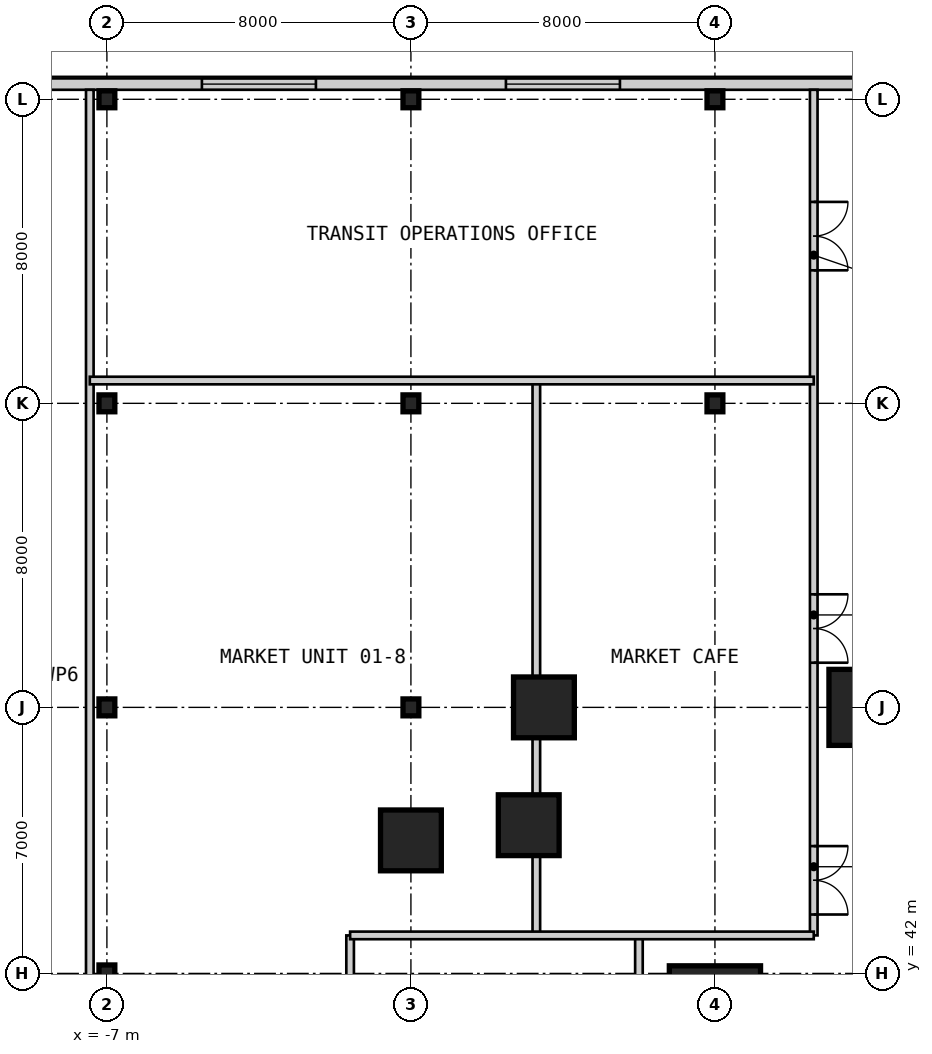
"""IFC4 building model, lengths in metres.
Left out: names, types, materials, properties, quantities, classifications, styles, units other than length and angle.
Written with IfcOpenShell. Run it as: python <this file> out.ifc"""

import sys

from ifc_helpers import new_model, si_unit, direction, frame, frame_2d, origin, origin_2d, place, context, subcontext, project, spatial, rectangle, i_section, extrude, element, fill, save


model = new_model("IFC4")
c1 = context("Model", 3, precision=1e-05, world=origin(), true_north=direction((0.0, 1.0)))
c2 = subcontext(c1, "Body", "Model", "MODEL_VIEW")
j1 = project(units=[si_unit("LENGTHUNIT", "METRE"), si_unit("PLANEANGLEUNIT", "RADIAN")], contexts=[c1])
p1 = place(None, origin())
s1 = spatial("IfcSite", under=j1, at=p1, CompositionType="ELEMENT")
p2 = place(p1, origin())
s2 = spatial("IfcBuilding", under=s1, at=p2, CompositionType="ELEMENT")
p3 = place(p2, frame((0.0, 0.0, 7.0)))
s3 = spatial("IfcBuildingStorey", under=s2, at=p3, CompositionType="ELEMENT", Elevation=7.0)
p4 = place(p3, frame((9.0, 41.0, 0.0), z_axis=(0.0, 0.0, 1.0), x_axis=(1.0, 0.0, 0.0)))
e1 = element("IfcColumn", 1, at=p4, inside=s3, PredefinedType="COLUMN", context=c2, shape_type="SweptSolid", body=[
    extrude(rectangle(XDim=2.4, YDim=2.4, at=origin_2d()), origin(), (0.0, 0.0, 1.0), 4.8),
])
p5 = place(p3, frame((13.0, 49.0, 0.0), z_axis=(0.0, 0.0, 1.0), x_axis=(1.0, 0.0, 0.0)))
e2 = element("IfcColumn", 2, at=p5, inside=s3, PredefinedType="COLUMN", context=c2, shape_type="SweptSolid", body=[
    extrude(rectangle(XDim=2.0, YDim=2.0, at=origin_2d()), origin(), (0.0, 0.0, 1.0), 4.8),
])
for number, where, z_axis, x_axis in (
    (3, (4.5, 49.0, 0.0), (0.0, 0.0, 1.0), (1.0, 0.0, 0.0)),
    (4, (4.1, 45.9, 0.0), (0.0, 0.0, 1.0), (1.0, 0.0, 0.0)),
    (5, (1.0, 45.5, 0.0), (0.0, 0.0, 1.0), (1.0, 0.0, 0.0)),
):
    element("IfcColumn", number, at=place(p3, frame(where, z_axis=z_axis, x_axis=x_axis)), inside=s3, PredefinedType="COLUMN", context=c2, shape_type="SweptSolid", body=[
        extrude(rectangle(XDim=1.6, YDim=1.6, at=origin_2d()), origin(), (0.0, 0.0, 1.0), 4.8),
    ])
for number, where, z_axis, x_axis in (
    (6, (-7.0, 42.0, 0.0), (0.0, 0.0, 1.0), (1.0, 0.0, 0.0)),
    (7, (-7.0, 49.0, 0.0), (0.0, 0.0, 1.0), (1.0, 0.0, 0.0)),
    (8, (-7.0, 57.0, 0.0), (0.0, 0.0, 1.0), (1.0, 0.0, 0.0)),
    (9, (-7.0, 65.0, 0.0), (0.0, 0.0, 1.0), (1.0, 0.0, 0.0)),
    (10, (1.0, 49.0, 0.0), (0.0, 0.0, 1.0), (1.0, 0.0, 0.0)),
    (11, (1.0, 57.0, 0.0), (0.0, 0.0, 1.0), (1.0, 0.0, 0.0)),
    (12, (1.0, 65.0, 0.0), (0.0, 0.0, 1.0), (1.0, 0.0, 0.0)),
    (13, (9.0, 57.0, 0.0), (0.0, 0.0, 1.0), (1.0, 0.0, 0.0)),
    (14, (9.0, 65.0, 0.0), (0.0, 0.0, 1.0), (1.0, 0.0, 0.0)),
):
    element("IfcColumn", number, at=place(p3, frame(where, z_axis=z_axis, x_axis=x_axis)), inside=s3, PredefinedType="COLUMN", context=c2, shape_type="SweptSolid", body=[
        extrude(i_section(OverallWidth=0.417, OverallDepth=0.445, WebThickness=0.039, FlangeThickness=0.063, at=origin_2d()), origin(), (0.0, 0.0, 1.0), 4.8),
    ])
p6 = place(p3, frame((65.55, 65.4, 0.0), z_axis=(0.0, 0.0, 1.0), x_axis=(-1.0, 0.0, 0.0)))
e15 = element("IfcWall", 15, at=p6, inside=s3, PredefinedType="SOLIDWALL", context=c2, shape_type="SweptSolid", body=[
    extrude(rectangle(XDim=81.1, YDim=0.3, at=frame_2d((40.55, 0.0))), origin(), (0.0, 0.0, 1.0), 4.5),
])
p7 = place(p6, frame((75.05, 0.0, 0.9)))
e16 = element("IfcOpeningElement", 16, at=p7, cuts=e15, PredefinedType="OPENING", context=c2, shape_type="SweptSolid", body=[
    extrude(rectangle(XDim=3.0, YDim=2.4, at=frame_2d((1.5, 1.2))), frame((0.0, 0.16, 0.0), z_axis=(0.0, -1.0, 0.0), x_axis=(1.0, 0.0, 0.0)), (0.0, 0.0, 1.0), 0.32),
])
p8 = place(p6, frame((67.05, 0.0, 0.9)))
e17 = element("IfcOpeningElement", 17, at=p8, cuts=e15, PredefinedType="OPENING", context=c2, shape_type="SweptSolid", body=[
    extrude(rectangle(XDim=3.0, YDim=2.4, at=frame_2d((1.5, 1.2))), frame((0.0, 0.16, 0.0), z_axis=(0.0, -1.0, 0.0), x_axis=(1.0, 0.0, 0.0)), (0.0, 0.0, 1.0), 0.32),
])
p9 = place(p6, frame((59.05, 0.0, 0.9)))
e18 = element("IfcOpeningElement", 18, at=p9, cuts=e15, PredefinedType="OPENING", context=c2, shape_type="SweptSolid", body=[
    extrude(rectangle(XDim=3.0, YDim=2.4, at=frame_2d((1.5, 1.2))), frame((0.0, 0.16, 0.0), z_axis=(0.0, -1.0, 0.0), x_axis=(1.0, 0.0, 0.0)), (0.0, 0.0, 1.0), 0.32),
])
p10 = place(p6, frame((45.05, 0.0, 0.9)))
e19 = element("IfcOpeningElement", 19, at=p10, cuts=e15, PredefinedType="OPENING", context=c2, shape_type="SweptSolid", body=[
    extrude(rectangle(XDim=3.0, YDim=2.4, at=frame_2d((1.5, 1.2))), frame((0.0, 0.16, 0.0), z_axis=(0.0, -1.0, 0.0), x_axis=(1.0, 0.0, 0.0)), (0.0, 0.0, 1.0), 0.32),
])
p11 = place(p6, frame((33.05, 0.0, 0.9)))
e20 = element("IfcOpeningElement", 20, at=p11, cuts=e15, PredefinedType="OPENING", context=c2, shape_type="SweptSolid", body=[
    extrude(rectangle(XDim=3.0, YDim=2.4, at=frame_2d((1.5, 1.2))), frame((0.0, 0.16, 0.0), z_axis=(0.0, -1.0, 0.0), x_axis=(1.0, 0.0, 0.0)), (0.0, 0.0, 1.0), 0.32),
])
p12 = place(p6, frame((24.55, 0.0, 0.9)))
e21 = element("IfcOpeningElement", 21, at=p12, cuts=e15, PredefinedType="OPENING", context=c2, shape_type="SweptSolid", body=[
    extrude(rectangle(XDim=3.0, YDim=2.4, at=frame_2d((1.5, 1.2))), frame((0.0, 0.16, 0.0), z_axis=(0.0, -1.0, 0.0), x_axis=(1.0, 0.0, 0.0)), (0.0, 0.0, 1.0), 0.32),
])
p13 = place(p6, frame((18.55, 0.0, 0.9)))
e22 = element("IfcOpeningElement", 22, at=p13, cuts=e15, PredefinedType="OPENING", context=c2, shape_type="SweptSolid", body=[
    extrude(rectangle(XDim=3.0, YDim=2.4, at=frame_2d((1.5, 1.2))), frame((0.0, 0.16, 0.0), z_axis=(0.0, -1.0, 0.0), x_axis=(1.0, 0.0, 0.0)), (0.0, 0.0, 1.0), 0.32),
])
p14 = place(p6, frame((11.05, 0.0, 0.9)))
e23 = element("IfcOpeningElement", 23, at=p14, cuts=e15, PredefinedType="OPENING", context=c2, shape_type="SweptSolid", body=[
    extrude(rectangle(XDim=3.0, YDim=2.4, at=frame_2d((1.5, 1.2))), frame((0.0, 0.16, 0.0), z_axis=(0.0, -1.0, 0.0), x_axis=(1.0, 0.0, 0.0)), (0.0, 0.0, 1.0), 0.32),
])
p15 = place(p6, frame((3.05, 0.0, 0.9)))
e24 = element("IfcOpeningElement", 24, at=p15, cuts=e15, PredefinedType="OPENING", context=c2, shape_type="SweptSolid", body=[
    extrude(rectangle(XDim=3.0, YDim=2.4, at=frame_2d((1.5, 1.2))), frame((0.0, 0.16, 0.0), z_axis=(0.0, -1.0, 0.0), x_axis=(1.0, 0.0, 0.0)), (0.0, 0.0, 1.0), 0.32),
])
p16 = place(p3, frame((-7.45, 34.4, 0.0), z_axis=(0.0, 0.0, 1.0), x_axis=(0.0, 1.0, 0.0)))
e25 = element("IfcWall", 25, at=p16, inside=s3, PredefinedType="PARTITIONING", context=c2, shape_type="SweptSolid", body=[
    extrude(rectangle(XDim=30.85, YDim=0.2, at=frame_2d((15.425, 0.0))), origin(), (0.0, 0.0, 1.0), 4.5),
])
p17 = place(p3, frame((-0.6, 34.4, 0.0), z_axis=(0.0, 0.0, 1.0), x_axis=(0.0, 1.0, 0.0)))
e26 = element("IfcWall", 26, at=p17, inside=s3, PredefinedType="PARTITIONING", context=c2, shape_type="SweptSolid", body=[
    extrude(rectangle(XDim=8.6, YDim=0.2, at=frame_2d((4.3, 0.0))), origin(), (0.0, 0.0, 1.0), 4.5),
])
p18 = place(p3, frame((4.3, 43.0, 0.0), z_axis=(0.0, 0.0, 1.0), x_axis=(0.0, 1.0, 0.0)))
e27 = element("IfcWall", 27, at=p18, inside=s3, PredefinedType="PARTITIONING", context=c2, shape_type="SweptSolid", body=[
    extrude(rectangle(XDim=2.1, YDim=0.2, at=frame_2d((1.05, 0.0))), origin(), (0.0, 0.0, 1.0), 4.5),
])
p19 = place(p3, frame((4.3, 46.7, 0.0), z_axis=(0.0, 0.0, 1.0), x_axis=(0.0, 1.0, 0.0)))
e28 = element("IfcWall", 28, at=p19, inside=s3, PredefinedType="PARTITIONING", context=c2, shape_type="SweptSolid", body=[
    extrude(rectangle(XDim=1.5, YDim=0.2, at=frame_2d((0.75, 0.0))), origin(), (0.0, 0.0, 1.0), 3.65),
])
p20 = place(p3, frame((4.3, 49.8, 0.0), z_axis=(0.0, 0.0, 1.0), x_axis=(0.0, 1.0, 0.0)))
e29 = element("IfcWall", 29, at=p20, inside=s3, PredefinedType="PARTITIONING", context=c2, shape_type="SweptSolid", body=[
    extrude(rectangle(XDim=7.8, YDim=0.2, at=frame_2d((3.9, 0.0))), origin(), (0.0, 0.0, 1.0), 4.5),
])
p21 = place(p3, frame((7.0, 22.0, 0.0), z_axis=(0.0, 0.0, 1.0), x_axis=(0.0, 1.0, 0.0)))
e30 = element("IfcWall", 30, at=p21, inside=s3, PredefinedType="PARTITIONING", context=c2, shape_type="SweptSolid", body=[
    extrude(rectangle(XDim=21.0, YDim=0.2, at=frame_2d((10.5, 0.0))), origin(), (0.0, 0.0, 1.0), 3.843),
])
p22 = place(p3, frame((11.6, 43.0, 0.0), z_axis=(0.0, 0.0, 1.0), x_axis=(0.0, 1.0, 0.0)))
e31 = element("IfcWall", 31, at=p22, inside=s3, PredefinedType="PARTITIONING", context=c2, shape_type="SweptSolid", body=[
    extrude(rectangle(XDim=22.25, YDim=0.2, at=frame_2d((11.125, 0.0))), origin(), (0.0, 0.0, 1.0), 4.5),
])
p23 = place(p22, frame((7.175, 0.0, 0.0)))
e32 = element("IfcOpeningElement", 32, at=p23, cuts=e31, PredefinedType="OPENING", context=c2, shape_type="SweptSolid", body=[
    extrude(rectangle(XDim=1.8, YDim=2.4, at=frame_2d((0.9, 1.2))), frame((0.0, 0.11, 0.0), z_axis=(0.0, -1.0, 0.0), x_axis=(1.0, 0.0, 0.0)), (0.0, 0.0, 1.0), 0.22),
])
p24 = place(p22, frame((0.55, 0.0, 0.0)))
e33 = element("IfcOpeningElement", 33, at=p24, cuts=e31, PredefinedType="OPENING", context=c2, shape_type="SweptSolid", body=[
    extrude(rectangle(XDim=1.8, YDim=2.4, at=frame_2d((0.9, 1.2))), frame((0.0, 0.11, 0.0), z_axis=(0.0, -1.0, 0.0), x_axis=(1.0, 0.0, 0.0)), (0.0, 0.0, 1.0), 0.22),
])
p25 = place(p22, frame((17.5, 0.0, 0.0)))
e34 = element("IfcOpeningElement", 34, at=p25, cuts=e31, PredefinedType="OPENING", context=c2, shape_type="SweptSolid", body=[
    extrude(rectangle(XDim=1.8, YDim=2.4, at=frame_2d((0.9, 1.2))), frame((0.0, 0.11, 0.0), z_axis=(0.0, -1.0, 0.0), x_axis=(1.0, 0.0, 0.0)), (0.0, 0.0, 1.0), 0.22),
])
p26 = place(p3, frame((-0.6, 43.0, 0.0), z_axis=(0.0, 0.0, 1.0), x_axis=(1.0, 0.0, 0.0)))
e35 = element("IfcWall", 35, at=p26, inside=s3, PredefinedType="PARTITIONING", context=c2, shape_type="SweptSolid", body=[
    extrude(rectangle(XDim=12.2, YDim=0.2, at=frame_2d((6.1, 0.0))), origin(), (0.0, 0.0, 1.0), 4.5),
])
p27 = place(p3, frame((-7.45, 57.6, 0.0), z_axis=(0.0, 0.0, 1.0), x_axis=(1.0, 0.0, 0.0)))
e36 = element("IfcWall", 36, at=p27, inside=s3, PredefinedType="PARTITIONING", context=c2, shape_type="SweptSolid", body=[
    extrude(rectangle(XDim=19.05, YDim=0.2, at=frame_2d((9.525, 0.0))), origin(), (0.0, 0.0, 1.0), 4.5),
])
p28 = place(p8, origin())
e37 = element("IfcWindow", 37, at=p28, inside=s3, PartitioningType="SINGLE_PANEL", PredefinedType="WINDOW", context=c2, shape_type="SweptSolid", body=[
    extrude(rectangle(XDim=3.0, YDim=2.4, at=frame_2d((1.5, 1.2))), frame((0.0, 0.03, 0.0), z_axis=(0.0, -1.0, 0.0), x_axis=(1.0, 0.0, 0.0)), (0.0, 0.0, 1.0), 0.06),
])
fill(e17, e37)
p29 = place(p9, origin())
e38 = element("IfcWindow", 38, at=p29, inside=s3, PartitioningType="SINGLE_PANEL", PredefinedType="WINDOW", context=c2, shape_type="SweptSolid", body=[
    extrude(rectangle(XDim=3.0, YDim=2.4, at=frame_2d((1.5, 1.2))), frame((0.0, 0.03, 0.0), z_axis=(0.0, -1.0, 0.0), x_axis=(1.0, 0.0, 0.0)), (0.0, 0.0, 1.0), 0.06),
])
fill(e18, e38)
p30 = place(p23, frame((1.8, 0.0, 0.0), z_axis=(0.0, 0.0, 1.0), x_axis=(-1.0, 0.0, 0.0)))
e39 = element("IfcDoor", 39, at=p30, inside=s3, OperationType="DOUBLE_DOOR_SINGLE_SWING", PredefinedType="DOOR", context=c2, shape_type="SweptSolid", body=[
    extrude(rectangle(XDim=1.8, YDim=2.4, at=frame_2d((0.9, 1.2))), frame((0.0, 0.025, 0.0), z_axis=(0.0, -1.0, 0.0), x_axis=(1.0, 0.0, 0.0)), (0.0, 0.0, 1.0), 0.05),
])
fill(e32, e39)
p31 = place(p24, frame((1.8, 0.0, 0.0), z_axis=(0.0, 0.0, 1.0), x_axis=(-1.0, 0.0, 0.0)))
e40 = element("IfcDoor", 40, at=p31, inside=s3, OperationType="DOUBLE_DOOR_SINGLE_SWING", PredefinedType="DOOR", context=c2, shape_type="SweptSolid", body=[
    extrude(rectangle(XDim=1.8, YDim=2.4, at=frame_2d((0.9, 1.2))), frame((0.0, 0.025, 0.0), z_axis=(0.0, -1.0, 0.0), x_axis=(1.0, 0.0, 0.0)), (0.0, 0.0, 1.0), 0.05),
])
fill(e33, e40)
p32 = place(p25, frame((1.8, 0.0, 0.0), z_axis=(0.0, 0.0, 1.0), x_axis=(-1.0, 0.0, 0.0)))
e41 = element("IfcDoor", 41, at=p32, inside=s3, OperationType="DOUBLE_DOOR_SINGLE_SWING", PredefinedType="DOOR", context=c2, shape_type="SweptSolid", body=[
    extrude(rectangle(XDim=1.8, YDim=2.4, at=frame_2d((0.9, 1.2))), frame((0.0, 0.025, 0.0), z_axis=(0.0, -1.0, 0.0), x_axis=(1.0, 0.0, 0.0)), (0.0, 0.0, 1.0), 0.05),
])
fill(e34, e41)
save(model, sys.argv[1])
